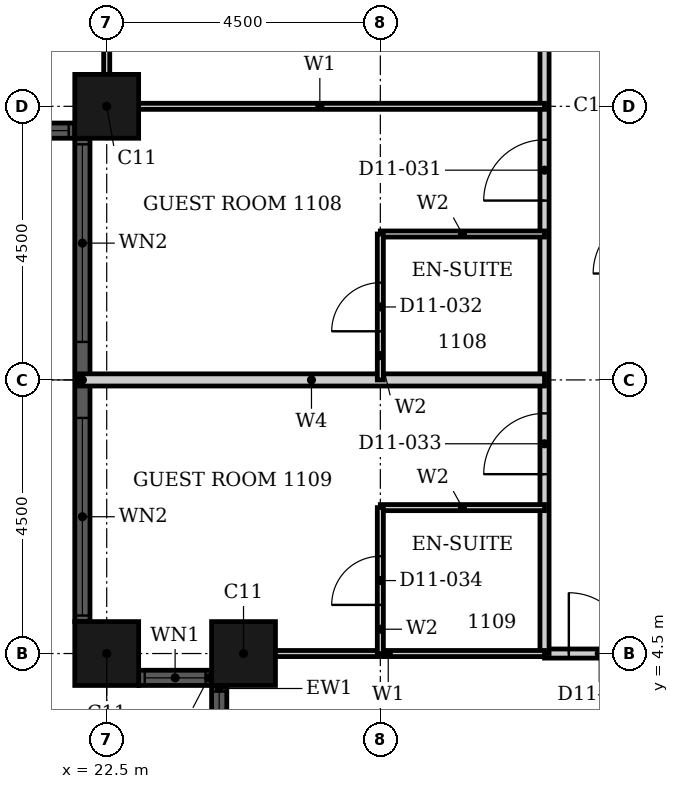
"""IFC4 building model, lengths in metres.
Left out: names, types, materials, properties, quantities, classifications, styles, units other than length and angle.
Written with IfcOpenShell. Run it as: python <this file> out.ifc"""

import sys

from ifc_helpers import new_model, si_unit, direction, frame, frame_2d, origin, origin_2d, place, context, subcontext, project, spatial, rectangle, hollow_rectangle, extrude, element, fill, save


model = new_model("IFC4")
c1 = context("Model", 3, precision=1e-05, world=origin(), true_north=direction((0.0, 1.0)))
c2 = subcontext(c1, "Body", "Model", "MODEL_VIEW")
j1 = project(units=[si_unit("LENGTHUNIT", "METRE"), si_unit("PLANEANGLEUNIT", "RADIAN")], contexts=[c1])
p1 = place(None, origin())
s1 = spatial("IfcSite", under=j1, at=p1, CompositionType="ELEMENT")
p2 = place(p1, origin())
s2 = spatial("IfcBuilding", under=s1, at=p2, CompositionType="ELEMENT")
p3 = place(p2, frame((0.0, 0.0, 52.8)))
s3 = spatial("IfcBuildingStorey", under=s2, at=p3, CompositionType="ELEMENT", Elevation=52.8)
for number, where, z_axis, x_axis in (
    (1, (22.5, 4.5, 0.0), (0.0, 0.0, 1.0), (1.0, 0.0, 0.0)),
    (2, (24.75, 4.5, 0.0), (0.0, 0.0, 1.0), (1.0, 0.0, 0.0)),
    (3, (22.5, 13.5, 0.0), (0.0, 0.0, 1.0), (1.0, 0.0, 0.0)),
):
    element("IfcColumn", number, at=place(p3, frame(where, z_axis=z_axis, x_axis=x_axis)), inside=s3, PredefinedType="COLUMN", context=c2, shape_type="SweptSolid", body=[
        extrude(hollow_rectangle(XDim=1.05, YDim=1.05, WallThickness=0.034, at=origin_2d()), origin(), (0.0, 0.0, 1.0), 3.6),
    ])
p4 = place(p3, frame((23.025, 4.1, 0.0), z_axis=(0.0, 0.0, 1.0), x_axis=(1.0, 0.0, 0.0)))
e4 = element("IfcWall", 4, at=p4, inside=s3, PredefinedType="SOLIDWALL", context=c2, shape_type="SweptSolid", body=[
    extrude(rectangle(XDim=1.2, YDim=0.25, at=frame_2d((0.6, 0.0))), origin(), (0.0, 0.0, 1.0), 3.6),
])
p5 = place(p4, frame((0.1, 0.0, 0.9)))
e5 = element("IfcOpeningElement", 5, at=p5, cuts=e4, PredefinedType="OPENING", context=c2, shape_type="SweptSolid", body=[
    extrude(rectangle(XDim=1.0, YDim=2.08, at=frame_2d((0.5, 1.04))), frame((0.0, 0.135, 0.0), z_axis=(0.0, -1.0, 0.0), x_axis=(1.0, 0.0, 0.0)), (0.0, 0.0, 1.0), 0.27),
])
p6 = place(p3, frame((24.35, 3.975, 0.0), z_axis=(0.0, 0.0, 1.0), x_axis=(0.0, -1.0, 0.0)))
e6 = element("IfcWall", 6, at=p6, inside=s3, PredefinedType="SOLIDWALL", context=c2, shape_type="SweptSolid", body=[
    extrude(rectangle(XDim=1.2, YDim=0.25, at=frame_2d((0.6, 0.0))), origin(), (0.0, 0.0, 1.0), 3.6),
])
p7 = place(p6, frame((0.1, 0.0, 0.9)))
e7 = element("IfcOpeningElement", 7, at=p7, cuts=e6, PredefinedType="OPENING", context=c2, shape_type="SweptSolid", body=[
    extrude(rectangle(XDim=1.0, YDim=2.08, at=frame_2d((0.5, 1.04))), frame((0.0, 0.135, 0.0), z_axis=(0.0, -1.0, 0.0), x_axis=(1.0, 0.0, 0.0)), (0.0, 0.0, 1.0), 0.27),
])
p8 = place(p3, frame((18.525, 13.1, 0.0), z_axis=(0.0, 0.0, 1.0), x_axis=(1.0, 0.0, 0.0)))
e8 = element("IfcWall", 8, at=p8, inside=s3, PredefinedType="SOLIDWALL", context=c2, shape_type="SweptSolid", body=[
    extrude(rectangle(XDim=3.45, YDim=0.25, at=frame_2d((1.725, 0.0))), origin(), (0.0, 0.0, 1.0), 3.6),
])
p9 = place(p8, frame((0.1, 0.0, 0.9)))
e9 = element("IfcOpeningElement", 9, at=p9, cuts=e8, PredefinedType="OPENING", context=c2, shape_type="SweptSolid", body=[
    extrude(rectangle(XDim=3.25, YDim=2.08, at=frame_2d((1.625, 1.04))), frame((0.0, 0.135, 0.0), z_axis=(0.0, -1.0, 0.0), x_axis=(1.0, 0.0, 0.0)), (0.0, 0.0, 1.0), 0.27),
])
p10 = place(p3, frame((22.1, 12.975, 0.0), z_axis=(0.0, 0.0, 1.0), x_axis=(0.0, -1.0, 0.0)))
e10 = element("IfcWall", 10, at=p10, inside=s3, PredefinedType="SOLIDWALL", context=c2, shape_type="SweptSolid", body=[
    extrude(rectangle(XDim=7.95, YDim=0.25, at=frame_2d((3.975, 0.0))), origin(), (0.0, 0.0, 1.0), 3.6),
])
p11 = place(p10, frame((0.1, 0.0, 0.9)))
e11 = element("IfcOpeningElement", 11, at=p11, cuts=e10, PredefinedType="OPENING", context=c2, shape_type="SweptSolid", body=[
    extrude(rectangle(XDim=3.25, YDim=2.08, at=frame_2d((1.625, 1.04))), frame((0.0, 0.135, 0.0), z_axis=(0.0, -1.0, 0.0), x_axis=(1.0, 0.0, 0.0)), (0.0, 0.0, 1.0), 0.27),
])
p12 = place(p10, frame((4.6, 0.0, 0.9)))
e12 = element("IfcOpeningElement", 12, at=p12, cuts=e10, PredefinedType="OPENING", context=c2, shape_type="SweptSolid", body=[
    extrude(rectangle(XDim=3.25, YDim=2.08, at=frame_2d((1.625, 1.04))), frame((0.0, 0.135, 0.0), z_axis=(0.0, -1.0, 0.0), x_axis=(1.0, 0.0, 0.0)), (0.0, 0.0, 1.0), 0.27),
])
p13 = place(p3, frame((29.7, 4.5, 0.0), z_axis=(0.0, 0.0, 1.0), x_axis=(1.0, 0.0, 0.0)))
e13 = element("IfcWall", 13, at=p13, inside=s3, PredefinedType="PARTITIONING", context=c2, shape_type="SweptSolid", body=[
    extrude(rectangle(XDim=1.8, YDim=0.15, at=frame_2d((0.9, 0.0))), origin(), (0.0, 0.0, 1.0), 3.3),
])
p14 = place(p13, frame((0.4, 0.0, 0.0)))
e14 = element("IfcOpeningElement", 14, at=p14, cuts=e13, PredefinedType="OPENING", context=c2, shape_type="SweptSolid", body=[
    extrude(rectangle(XDim=1.0, YDim=2.1, at=frame_2d((0.5, 1.05))), frame((0.0, 0.085, 0.0), z_axis=(0.0, -1.0, 0.0), x_axis=(1.0, 0.0, 0.0)), (0.0, 0.0, 1.0), 0.17),
])
p15 = place(p3, frame((29.7, 4.5, 0.0), z_axis=(0.0, 0.0, 1.0), x_axis=(0.0, 1.0, 0.0)))
e15 = element("IfcWall", 15, at=p15, inside=s3, PredefinedType="PARTITIONING", context=c2, shape_type="SweptSolid", body=[
    extrude(rectangle(XDim=16.2, YDim=0.15, at=frame_2d((8.1, 0.0))), origin(), (0.0, 0.0, 1.0), 3.3),
])
p16 = place(p15, frame((7.45, 0.0, 0.0)))
e16 = element("IfcOpeningElement", 16, at=p16, cuts=e15, PredefinedType="OPENING", context=c2, shape_type="SweptSolid", body=[
    extrude(rectangle(XDim=1.0, YDim=2.1, at=frame_2d((0.5, 1.05))), frame((0.0, 0.085, 0.0), z_axis=(0.0, -1.0, 0.0), x_axis=(1.0, 0.0, 0.0)), (0.0, 0.0, 1.0), 0.17),
])
p17 = place(p15, frame((2.95, 0.0, 0.0)))
e17 = element("IfcOpeningElement", 17, at=p17, cuts=e15, PredefinedType="OPENING", context=c2, shape_type="SweptSolid", body=[
    extrude(rectangle(XDim=1.0, YDim=2.1, at=frame_2d((0.5, 1.05))), frame((0.0, 0.085, 0.0), z_axis=(0.0, -1.0, 0.0), x_axis=(1.0, 0.0, 0.0)), (0.0, 0.0, 1.0), 0.17),
])
p18 = place(p3, frame((22.31, 13.5, 0.0), z_axis=(0.0, 0.0, 1.0), x_axis=(1.0, 0.0, 0.0)))
e18 = element("IfcWall", 18, at=p18, inside=s3, PredefinedType="PARTITIONING", context=c2, shape_type="SweptSolid", body=[
    extrude(rectangle(XDim=7.39, YDim=0.1, at=frame_2d((3.695, 0.0))), origin(), (0.0, 0.0, 1.0), 2.38),
])
p19 = place(p3, frame((24.56, 4.5, 0.0), z_axis=(0.0, 0.0, 1.0), x_axis=(1.0, 0.0, 0.0)))
e19 = element("IfcWall", 19, at=p19, inside=s3, PredefinedType="PARTITIONING", context=c2, shape_type="SweptSolid", body=[
    extrude(rectangle(XDim=5.14, YDim=0.1, at=frame_2d((2.57, 0.0))), origin(), (0.0, 0.0, 1.0), 3.3),
])
p20 = place(p3, frame((22.5, 13.31, 0.0), z_axis=(0.0, 0.0, 1.0), x_axis=(0.0, 1.0, 0.0)))
e20 = element("IfcWall", 20, at=p20, inside=s3, PredefinedType="PARTITIONING", context=c2, shape_type="SweptSolid", body=[
    extrude(rectangle(XDim=7.39, YDim=0.1, at=frame_2d((3.695, 0.0))), origin(), (0.0, 0.0, 1.0), 3.3),
])
p21 = place(p3, frame((22.035, 9.0, 0.0), z_axis=(0.0, 0.0, 1.0), x_axis=(1.0, 0.0, 0.0)))
e21 = element("IfcWall", 21, at=p21, inside=s3, PredefinedType="PARTITIONING", context=c2, shape_type="SweptSolid", body=[
    extrude(rectangle(XDim=7.665, YDim=0.2, at=frame_2d((3.833, 0.0))), origin(), (0.0, 0.0, 1.0), 3.3),
])
for number, where, z_axis, x_axis in (
    (22, (27.0, 11.4, 0.0), (0.0, 0.0, 1.0), (1.0, 0.0, 0.0)),
    (23, (27.0, 6.9, 0.0), (0.0, 0.0, 1.0), (1.0, 0.0, 0.0)),
):
    element("IfcWall", number, at=place(p3, frame(where, z_axis=z_axis, x_axis=x_axis)), inside=s3, PredefinedType="PARTITIONING", context=c2, shape_type="SweptSolid", body=[
        extrude(rectangle(XDim=2.7, YDim=0.1, at=frame_2d((1.35, 0.0))), origin(), (0.0, 0.0, 1.0), 3.3),
    ])
p22 = place(p3, frame((27.0, 9.0, 0.0), z_axis=(0.0, 0.0, 1.0), x_axis=(0.0, 1.0, 0.0)))
e24 = element("IfcWall", 24, at=p22, inside=s3, PredefinedType="PARTITIONING", context=c2, shape_type="SweptSolid", body=[
    extrude(rectangle(XDim=2.4, YDim=0.1, at=frame_2d((1.2, 0.0))), origin(), (0.0, 0.0, 1.0), 2.58),
])
p23 = place(p22, frame((0.8, 0.0, 0.0)))
e25 = element("IfcOpeningElement", 25, at=p23, cuts=e24, PredefinedType="OPENING", context=c2, shape_type="SweptSolid", body=[
    extrude(rectangle(XDim=0.8, YDim=2.1, at=frame_2d((0.4, 1.05))), frame((0.0, 0.06, 0.0), z_axis=(0.0, -1.0, 0.0), x_axis=(1.0, 0.0, 0.0)), (0.0, 0.0, 1.0), 0.12),
])
p24 = place(p3, frame((27.0, 4.5, 0.0), z_axis=(0.0, 0.0, 1.0), x_axis=(0.0, 1.0, 0.0)))
e26 = element("IfcWall", 26, at=p24, inside=s3, PredefinedType="PARTITIONING", context=c2, shape_type="SweptSolid", body=[
    extrude(rectangle(XDim=2.4, YDim=0.1, at=frame_2d((1.2, 0.0))), origin(), (0.0, 0.0, 1.0), 2.58),
])
p25 = place(p24, frame((0.8, 0.0, 0.0)))
e27 = element("IfcOpeningElement", 27, at=p25, cuts=e26, PredefinedType="OPENING", context=c2, shape_type="SweptSolid", body=[
    extrude(rectangle(XDim=0.8, YDim=2.1, at=frame_2d((0.4, 1.05))), frame((0.0, 0.06, 0.0), z_axis=(0.0, -1.0, 0.0), x_axis=(1.0, 0.0, 0.0)), (0.0, 0.0, 1.0), 0.12),
])
p26 = place(p5, origin())
e28 = element("IfcWindow", 28, at=p26, inside=s3, PartitioningType="SINGLE_PANEL", PredefinedType="WINDOW", context=c2, shape_type="SweptSolid", body=[
    extrude(rectangle(XDim=1.0, YDim=2.08, at=frame_2d((0.5, 1.04))), frame((0.0, 0.03, 0.0), z_axis=(0.0, -1.0, 0.0), x_axis=(1.0, 0.0, 0.0)), (0.0, 0.0, 1.0), 0.06),
])
fill(e5, e28)
p27 = place(p7, origin())
e29 = element("IfcWindow", 29, at=p27, inside=s3, PartitioningType="SINGLE_PANEL", PredefinedType="WINDOW", context=c2, shape_type="SweptSolid", body=[
    extrude(rectangle(XDim=1.0, YDim=2.08, at=frame_2d((0.5, 1.04))), frame((0.0, 0.03, 0.0), z_axis=(0.0, -1.0, 0.0), x_axis=(1.0, 0.0, 0.0)), (0.0, 0.0, 1.0), 0.06),
])
fill(e7, e29)
p28 = place(p9, origin())
e30 = element("IfcWindow", 30, at=p28, inside=s3, PartitioningType="SINGLE_PANEL", PredefinedType="WINDOW", context=c2, shape_type="SweptSolid", body=[
    extrude(rectangle(XDim=3.25, YDim=2.08, at=frame_2d((1.625, 1.04))), frame((0.0, 0.03, 0.0), z_axis=(0.0, -1.0, 0.0), x_axis=(1.0, 0.0, 0.0)), (0.0, 0.0, 1.0), 0.06),
])
fill(e9, e30)
p29 = place(p11, origin())
e31 = element("IfcWindow", 31, at=p29, inside=s3, PartitioningType="SINGLE_PANEL", PredefinedType="WINDOW", context=c2, shape_type="SweptSolid", body=[
    extrude(rectangle(XDim=3.25, YDim=2.08, at=frame_2d((1.625, 1.04))), frame((0.0, 0.03, 0.0), z_axis=(0.0, -1.0, 0.0), x_axis=(1.0, 0.0, 0.0)), (0.0, 0.0, 1.0), 0.06),
])
fill(e11, e31)
p30 = place(p12, origin())
e32 = element("IfcWindow", 32, at=p30, inside=s3, PartitioningType="SINGLE_PANEL", PredefinedType="WINDOW", context=c2, shape_type="SweptSolid", body=[
    extrude(rectangle(XDim=3.25, YDim=2.08, at=frame_2d((1.625, 1.04))), frame((0.0, 0.03, 0.0), z_axis=(0.0, -1.0, 0.0), x_axis=(1.0, 0.0, 0.0)), (0.0, 0.0, 1.0), 0.06),
])
fill(e12, e32)
p31 = place(p16, origin())
e33 = element("IfcDoor", 33, at=p31, inside=s3, OperationType="SINGLE_SWING_RIGHT", PredefinedType="DOOR", context=c2, shape_type="SweptSolid", body=[
    extrude(rectangle(XDim=1.0, YDim=2.1, at=frame_2d((0.5, 1.05))), frame((0.0, 0.025, 0.0), z_axis=(0.0, -1.0, 0.0), x_axis=(1.0, 0.0, 0.0)), (0.0, 0.0, 1.0), 0.05),
])
fill(e16, e33)
p32 = place(p23, origin())
e34 = element("IfcDoor", 34, at=p32, inside=s3, OperationType="SINGLE_SWING_LEFT", PredefinedType="DOOR", context=c2, shape_type="SweptSolid", body=[
    extrude(rectangle(XDim=0.8, YDim=2.1, at=frame_2d((0.4, 1.05))), frame((0.0, 0.025, 0.0), z_axis=(0.0, -1.0, 0.0), x_axis=(1.0, 0.0, 0.0)), (0.0, 0.0, 1.0), 0.05),
])
fill(e25, e34)
p33 = place(p17, origin())
e35 = element("IfcDoor", 35, at=p33, inside=s3, OperationType="SINGLE_SWING_RIGHT", PredefinedType="DOOR", context=c2, shape_type="SweptSolid", body=[
    extrude(rectangle(XDim=1.0, YDim=2.1, at=frame_2d((0.5, 1.05))), frame((0.0, 0.025, 0.0), z_axis=(0.0, -1.0, 0.0), x_axis=(1.0, 0.0, 0.0)), (0.0, 0.0, 1.0), 0.05),
])
fill(e17, e35)
p34 = place(p25, origin())
e36 = element("IfcDoor", 36, at=p34, inside=s3, OperationType="SINGLE_SWING_LEFT", PredefinedType="DOOR", context=c2, shape_type="SweptSolid", body=[
    extrude(rectangle(XDim=0.8, YDim=2.1, at=frame_2d((0.4, 1.05))), frame((0.0, 0.025, 0.0), z_axis=(0.0, -1.0, 0.0), x_axis=(1.0, 0.0, 0.0)), (0.0, 0.0, 1.0), 0.05),
])
fill(e27, e36)
p35 = place(p14, origin())
e37 = element("IfcDoor", 37, at=p35, inside=s3, OperationType="SINGLE_SWING_LEFT", PredefinedType="DOOR", context=c2, shape_type="SweptSolid", body=[
    extrude(rectangle(XDim=1.0, YDim=2.1, at=frame_2d((0.5, 1.05))), frame((0.0, 0.025, 0.0), z_axis=(0.0, -1.0, 0.0), x_axis=(1.0, 0.0, 0.0)), (0.0, 0.0, 1.0), 0.05),
])
fill(e14, e37)
save(model, sys.argv[1])
